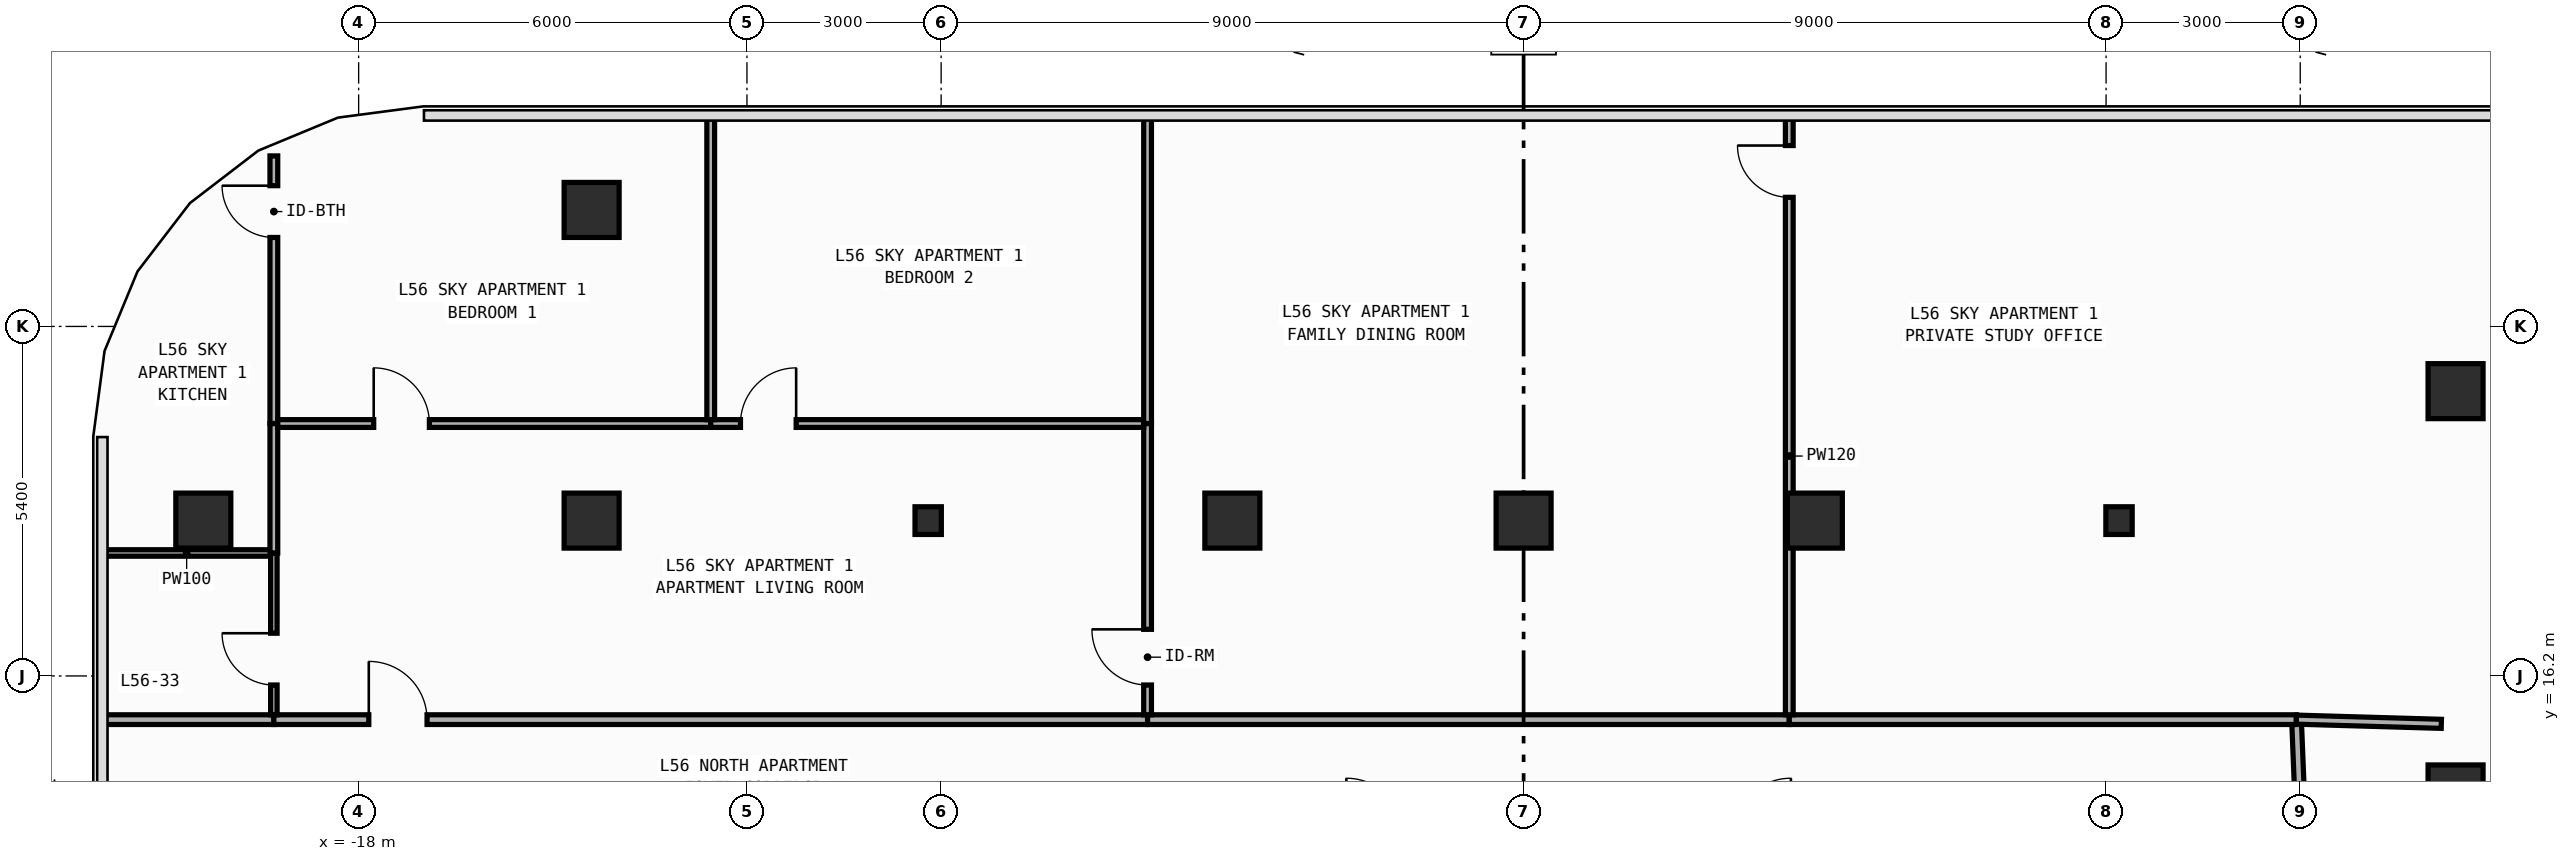
"""IFC4 building model, lengths in metres.
Left out: names, types, materials, properties, quantities, classifications, styles, units other than length and angle.
Written with IfcOpenShell. Run it as: python <this file> out.ifc"""

import sys

from ifc_helpers import new_model, si_unit, direction, frame, frame_2d, origin, origin_2d, place, context, subcontext, project, spatial, rectangle, i_section, extrude, element, fill, save


model = new_model("IFC4")
c1 = context("Model", 3, precision=1e-05, world=origin(), true_north=direction((0.0, 1.0)))
c2 = subcontext(c1, "Body", "Model", "MODEL_VIEW")
j1 = project(units=[si_unit("LENGTHUNIT", "METRE"), si_unit("PLANEANGLEUNIT", "RADIAN")], contexts=[c1])
p1 = place(None, origin())
s1 = spatial("IfcSite", under=j1, at=p1, CompositionType="ELEMENT")
p2 = place(p1, origin())
s2 = spatial("IfcBuilding", under=s1, at=p2, CompositionType="ELEMENT")
p3 = place(p2, frame((0.0, 0.0, 240.4)))
s3 = spatial("IfcBuildingStorey", under=s2, at=p3, CompositionType="ELEMENT", Elevation=240.4)
for number, where, z_axis, x_axis in (
    (1, (-9.2, 18.6, 0.0), (0.0, 0.0, 1.0), (1.0, 0.0, 0.0)),
    (2, (9.2, 18.6, 0.0), (0.0, 0.0, 1.0), (1.0, 0.0, 0.0)),
):
    element("IfcColumn", number, at=place(p3, frame(where, z_axis=z_axis, x_axis=x_axis)), inside=s3, PredefinedType="COLUMN", context=c2, shape_type="SweptSolid", body=[
        extrude(i_section(OverallWidth=0.407, OverallDepth=0.428, WebThickness=0.02, FlangeThickness=0.035, FilletRadius=0.022, at=origin_2d()), origin(), (0.0, 0.0, 1.0), 3.6),
    ])
for number, where, z_axis, x_axis in (
    (3, (-20.4, 18.6, 0.0), (0.0, 0.0, 1.0), (1.0, 0.0, 0.0)),
    (4, (-14.4, 18.6, 0.0), (0.0, 0.0, 1.0), (1.0, 0.0, 0.0)),
    (5, (14.4, 14.4, 0.0), (0.0, 0.0, 1.0), (1.0, 0.0, 0.0)),
    (6, (-4.5, 18.6, 0.0), (0.0, 0.0, 1.0), (1.0, 0.0, 0.0)),
    (7, (0.0, 18.6, 0.0), (0.0, 0.0, 1.0), (1.0, 0.0, 0.0)),
    (8, (4.5, 18.6, 0.0), (0.0, 0.0, 1.0), (1.0, 0.0, 0.0)),
    (9, (-14.4, 23.4, 0.0), (0.0, 0.0, 1.0), (1.0, 0.0, 0.0)),
    (10, (14.4, 20.6, 0.0), (0.0, 0.0, 1.0), (1.0, 0.0, 0.0)),
):
    element("IfcColumn", number, at=place(p3, frame(where, z_axis=z_axis, x_axis=x_axis)), inside=s3, PredefinedType="COLUMN", context=c2, shape_type="SweptSolid", body=[
        extrude(rectangle(XDim=0.85, YDim=0.85, at=origin_2d()), origin(), (0.0, 0.0, 1.0), 3.6),
    ])
p4 = place(p3, frame((-21.955, 15.525, 0.0), z_axis=(0.0, 0.0, 1.0), x_axis=(1.0, 0.0, 0.0)))
e11 = element("IfcWall", 11, at=p4, inside=s3, PredefinedType="PARTITIONING", context=c2, shape_type="SweptSolid", body=[
    extrude(rectangle(XDim=2.645, YDim=0.15, at=frame_2d((1.323, 0.0))), origin(), (0.0, 0.0, 1.0), 3.34),
])
p5 = place(p3, frame((-19.31, 15.525, 0.0), z_axis=(0.0, 0.0, 1.0), x_axis=(1.0, 0.0, 0.0)))
e12 = element("IfcWall", 12, at=p5, inside=s3, PredefinedType="PARTITIONING", context=c2, shape_type="SweptSolid", body=[
    extrude(rectangle(XDim=13.5, YDim=0.15, at=frame_2d((6.75, 0.0))), origin(), (0.0, 0.0, 1.0), 3.34),
])
p6 = place(p5, frame((1.467, 0.0, 0.0)))
e13 = element("IfcOpeningElement", 13, at=p6, cuts=e12, PredefinedType="OPENING", context=c2, shape_type="SweptSolid", body=[
    extrude(rectangle(XDim=0.9, YDim=2.15, at=frame_2d((0.45, 1.075))), frame((0.0, 0.085, 0.0), z_axis=(0.0, -1.0, 0.0), x_axis=(1.0, 0.0, 0.0)), (0.0, 0.0, 1.0), 0.17),
])
p7 = place(p3, frame((-5.81, 15.525, 0.0), z_axis=(0.0, 0.0, 1.0), x_axis=(1.0, 0.0, 0.0)))
e14 = element("IfcWall", 14, at=p7, inside=s3, PredefinedType="PARTITIONING", context=c2, shape_type="SweptSolid", body=[
    extrude(rectangle(XDim=9.915, YDim=0.15, at=frame_2d((4.958, 0.0))), origin(), (0.0, 0.0, 1.0), 3.34),
])
p8 = place(p3, frame((4.105, 15.525, 0.0), z_axis=(0.0, 0.0, 1.0), x_axis=(1.0, 0.0, 0.0)))
e15 = element("IfcWall", 15, at=p8, inside=s3, PredefinedType="PARTITIONING", context=c2, shape_type="SweptSolid", body=[
    extrude(rectangle(XDim=7.835, YDim=0.15, at=frame_2d((3.917, 0.0))), origin(), (0.0, 0.0, 1.0), 3.34),
])
p9 = place(p3, frame((12.015, 13.72, 0.0), z_axis=(0.0, 0.0, 1.0), x_axis=(-0.040046877756, 0.99919780203, 0.0)))
e16 = element("IfcWall", 16, at=p9, inside=s3, PredefinedType="PARTITIONING", context=c2, shape_type="SweptSolid", body=[
    extrude(rectangle(XDim=1.731, YDim=0.15, at=frame_2d((0.866, 0.0))), origin(), (0.0, 0.0, 1.0), 3.34),
])
p10 = place(p3, frame((-21.955, 18.1, 0.0), z_axis=(0.0, 0.0, 1.0), x_axis=(1.0, 0.0, 0.0)))
e17 = element("IfcWall", 17, at=p10, inside=s3, PredefinedType="PARTITIONING", context=c2, shape_type="SweptSolid", body=[
    extrude(rectangle(XDim=2.595, YDim=0.1, at=frame_2d((1.297, 0.0))), origin(), (0.0, 0.0, 1.0), 3.34),
])
p11 = place(p3, frame((-19.31, 15.6, 0.0), z_axis=(0.0, 0.0, 1.0), x_axis=(0.0, 1.0, 0.0)))
e18 = element("IfcWall", 18, at=p11, inside=s3, PredefinedType="PARTITIONING", context=c2, shape_type="SweptSolid", body=[
    extrude(rectangle(XDim=2.5, YDim=0.1, at=frame_2d((1.25, 0.0))), origin(), (0.0, 0.0, 1.0), 3.34),
])
p12 = place(p11, frame((0.46, 0.0, 0.0)))
e19 = element("IfcOpeningElement", 19, at=p12, cuts=e18, PredefinedType="OPENING", context=c2, shape_type="SweptSolid", body=[
    extrude(rectangle(XDim=0.8, YDim=2.1, at=frame_2d((0.4, 1.05))), frame((0.0, 0.06, 0.0), z_axis=(0.0, -1.0, 0.0), x_axis=(1.0, 0.0, 0.0)), (0.0, 0.0, 1.0), 0.12),
])
p13 = place(p3, frame((-19.31, 18.1, 0.0), z_axis=(0.0, 0.0, 1.0), x_axis=(0.0, 1.0, 0.0)))
e20 = element("IfcWall", 20, at=p13, inside=s3, PredefinedType="PARTITIONING", context=c2, shape_type="SweptSolid", body=[
    extrude(rectangle(XDim=2.0, YDim=0.12, at=frame_2d((1.0, 0.0))), origin(), (0.0, 0.0, 1.0), 3.34),
])
p14 = place(p3, frame((-19.31, 20.1, 0.0), z_axis=(0.0, 0.0, 1.0), x_axis=(0.0, 1.0, 0.0)))
e21 = element("IfcWall", 21, at=p14, inside=s3, PredefinedType="PARTITIONING", context=c2, shape_type="SweptSolid", body=[
    extrude(rectangle(XDim=4.135, YDim=0.12, at=frame_2d((2.067, 0.0))), origin(), (0.0, 0.0, 1.0), 3.34),
])
p15 = place(p14, frame((2.875, 0.0, 0.0)))
e22 = element("IfcOpeningElement", 22, at=p15, cuts=e21, PredefinedType="OPENING", context=c2, shape_type="SweptSolid", body=[
    extrude(rectangle(XDim=0.8, YDim=2.1, at=frame_2d((0.4, 1.05))), frame((0.0, 0.07, 0.0), z_axis=(0.0, -1.0, 0.0), x_axis=(1.0, 0.0, 0.0)), (0.0, 0.0, 1.0), 0.14),
])
p16 = place(p3, frame((-5.81, 15.6, 0.0), z_axis=(0.0, 0.0, 1.0), x_axis=(0.0, 1.0, 0.0)))
e23 = element("IfcWall", 23, at=p16, inside=s3, PredefinedType="PARTITIONING", context=c2, shape_type="SweptSolid", body=[
    extrude(rectangle(XDim=4.5, YDim=0.12, at=frame_2d((2.25, 0.0))), origin(), (0.0, 0.0, 1.0), 3.34),
])
p17 = place(p16, frame((0.46, 0.0, 0.0)))
e24 = element("IfcOpeningElement", 24, at=p17, cuts=e23, PredefinedType="OPENING", context=c2, shape_type="SweptSolid", body=[
    extrude(rectangle(XDim=0.86, YDim=2.15, at=frame_2d((0.43, 1.075))), frame((0.0, 0.07, 0.0), z_axis=(0.0, -1.0, 0.0), x_axis=(1.0, 0.0, 0.0)), (0.0, 0.0, 1.0), 0.14),
])
p18 = place(p3, frame((-19.25, 20.1, 0.0), z_axis=(0.0, 0.0, 1.0), x_axis=(1.0, 0.0, 0.0)))
e25 = element("IfcWall", 25, at=p18, inside=s3, PredefinedType="PARTITIONING", context=c2, shape_type="SweptSolid", body=[
    extrude(rectangle(XDim=6.69, YDim=0.12, at=frame_2d((3.345, 0.0))), origin(), (0.0, 0.0, 1.0), 3.34),
])
p19 = place(p18, frame((1.483, 0.0, 0.0)))
e26 = element("IfcOpeningElement", 26, at=p19, cuts=e25, PredefinedType="OPENING", context=c2, shape_type="SweptSolid", body=[
    extrude(rectangle(XDim=0.86, YDim=2.15, at=frame_2d((0.43, 1.075))), frame((0.0, 0.07, 0.0), z_axis=(0.0, -1.0, 0.0), x_axis=(1.0, 0.0, 0.0)), (0.0, 0.0, 1.0), 0.14),
])
p20 = place(p3, frame((-12.56, 20.1, 0.0), z_axis=(0.0, 0.0, 1.0), x_axis=(1.0, 0.0, 0.0)))
e27 = element("IfcWall", 27, at=p20, inside=s3, PredefinedType="PARTITIONING", context=c2, shape_type="SweptSolid", body=[
    extrude(rectangle(XDim=6.69, YDim=0.12, at=frame_2d((3.345, 0.0))), origin(), (0.0, 0.0, 1.0), 3.34),
])
p21 = place(p20, frame((0.46, 0.0, 0.0)))
e28 = element("IfcOpeningElement", 28, at=p21, cuts=e27, PredefinedType="OPENING", context=c2, shape_type="SweptSolid", body=[
    extrude(rectangle(XDim=0.86, YDim=2.15, at=frame_2d((0.43, 1.075))), frame((0.0, 0.07, 0.0), z_axis=(0.0, -1.0, 0.0), x_axis=(1.0, 0.0, 0.0)), (0.0, 0.0, 1.0), 0.14),
])
p22 = place(p3, frame((4.105, 15.6, 0.0), z_axis=(0.0, 0.0, 1.0), x_axis=(0.0, 1.0, 0.0)))
e29 = element("IfcWall", 29, at=p22, inside=s3, PredefinedType="PARTITIONING", context=c2, shape_type="SweptSolid", body=[
    extrude(rectangle(XDim=9.255, YDim=0.12, at=frame_2d((4.627, 0.0))), origin(), (0.0, 0.0, 1.0), 3.34),
])
p23 = place(p22, frame((7.995, 0.0, 0.0)))
e30 = element("IfcOpeningElement", 30, at=p23, cuts=e29, PredefinedType="OPENING", context=c2, shape_type="SweptSolid", body=[
    extrude(rectangle(XDim=0.8, YDim=2.1, at=frame_2d((0.4, 1.05))), frame((0.0, 0.07, 0.0), z_axis=(0.0, -1.0, 0.0), x_axis=(1.0, 0.0, 0.0)), (0.0, 0.0, 1.0), 0.14),
])
p24 = place(p3, frame((-5.81, 20.1, 0.0), z_axis=(0.0, 0.0, 1.0), x_axis=(0.0, 1.0, 0.0)))
e31 = element("IfcWall", 31, at=p24, inside=s3, PredefinedType="PARTITIONING", context=c2, shape_type="SweptSolid", body=[
    extrude(rectangle(XDim=4.755, YDim=0.12, at=frame_2d((2.377, 0.0))), origin(), (0.0, 0.0, 1.0), 3.34),
])
p25 = place(p3, frame((11.94, 15.525, 0.0), z_axis=(0.0, 0.0, 1.0), x_axis=(0.99958000177, -0.028979649098, 0.0)))
e32 = element("IfcWall", 32, at=p25, inside=s3, PredefinedType="PARTITIONING", context=c2, shape_type="SweptSolid", body=[
    extrude(rectangle(XDim=2.241, YDim=0.14, at=frame_2d((1.121, 0.0))), origin(), (0.0, 0.0, 1.0), 3.34),
])
p26 = place(p3, frame((-12.56, 20.16, 0.0), z_axis=(0.0, 0.0, 1.0), x_axis=(0.0, 1.0, 0.0)))
e33 = element("IfcWall", 33, at=p26, inside=s3, PredefinedType="PARTITIONING", context=c2, shape_type="SweptSolid", body=[
    extrude(rectangle(XDim=4.695, YDim=0.12, at=frame_2d((2.348, 0.0))), origin(), (0.0, 0.0, 1.0), 3.34),
])
p27 = place(p6, origin())
e34 = element("IfcDoor", 34, at=p27, inside=s3, OperationType="SINGLE_SWING_LEFT", PredefinedType="DOOR", context=c2, shape_type="SweptSolid", body=[
    extrude(rectangle(XDim=0.9, YDim=2.15, at=frame_2d((0.45, 1.075))), frame((0.0, 0.025, 0.0), z_axis=(0.0, -1.0, 0.0), x_axis=(1.0, 0.0, 0.0)), (0.0, 0.0, 1.0), 0.05),
])
fill(e13, e34)
p28 = place(p12, origin())
e35 = element("IfcDoor", 35, at=p28, inside=s3, OperationType="SINGLE_SWING_RIGHT", PredefinedType="DOOR", context=c2, shape_type="SweptSolid", body=[
    extrude(rectangle(XDim=0.8, YDim=2.1, at=frame_2d((0.4, 1.05))), frame((0.0, 0.025, 0.0), z_axis=(0.0, -1.0, 0.0), x_axis=(1.0, 0.0, 0.0)), (0.0, 0.0, 1.0), 0.05),
])
fill(e19, e35)
p29 = place(p17, origin())
e36 = element("IfcDoor", 36, at=p29, inside=s3, OperationType="SINGLE_SWING_RIGHT", PredefinedType="DOOR", context=c2, shape_type="SweptSolid", body=[
    extrude(rectangle(XDim=0.86, YDim=2.15, at=frame_2d((0.43, 1.075))), frame((0.0, 0.025, 0.0), z_axis=(0.0, -1.0, 0.0), x_axis=(1.0, 0.0, 0.0)), (0.0, 0.0, 1.0), 0.05),
])
fill(e24, e36)
p30 = place(p19, origin())
e37 = element("IfcDoor", 37, at=p30, inside=s3, OperationType="SINGLE_SWING_LEFT", PredefinedType="DOOR", context=c2, shape_type="SweptSolid", body=[
    extrude(rectangle(XDim=0.86, YDim=2.15, at=frame_2d((0.43, 1.075))), frame((0.0, 0.025, 0.0), z_axis=(0.0, -1.0, 0.0), x_axis=(1.0, 0.0, 0.0)), (0.0, 0.0, 1.0), 0.05),
])
fill(e26, e37)
p31 = place(p21, origin())
e38 = element("IfcDoor", 38, at=p31, inside=s3, OperationType="SINGLE_SWING_RIGHT", PredefinedType="DOOR", context=c2, shape_type="SweptSolid", body=[
    extrude(rectangle(XDim=0.86, YDim=2.15, at=frame_2d((0.43, 1.075))), frame((0.0, 0.025, 0.0), z_axis=(0.0, -1.0, 0.0), x_axis=(1.0, 0.0, 0.0)), (0.0, 0.0, 1.0), 0.05),
])
fill(e28, e38)
p32 = place(p23, origin())
e39 = element("IfcDoor", 39, at=p32, inside=s3, OperationType="SINGLE_SWING_RIGHT", PredefinedType="DOOR", context=c2, shape_type="SweptSolid", body=[
    extrude(rectangle(XDim=0.8, YDim=2.1, at=frame_2d((0.4, 1.05))), frame((0.0, 0.025, 0.0), z_axis=(0.0, -1.0, 0.0), x_axis=(1.0, 0.0, 0.0)), (0.0, 0.0, 1.0), 0.05),
])
fill(e30, e39)
p33 = place(p15, origin())
e40 = element("IfcDoor", 40, at=p33, inside=s3, OperationType="SINGLE_SWING_RIGHT", PredefinedType="DOOR", context=c2, shape_type="SweptSolid", body=[
    extrude(rectangle(XDim=0.8, YDim=2.1, at=frame_2d((0.4, 1.05))), frame((0.0, 0.025, 0.0), z_axis=(0.0, -1.0, 0.0), x_axis=(1.0, 0.0, 0.0)), (0.0, 0.0, 1.0), 0.05),
])
fill(e22, e40)
save(model, sys.argv[1])
